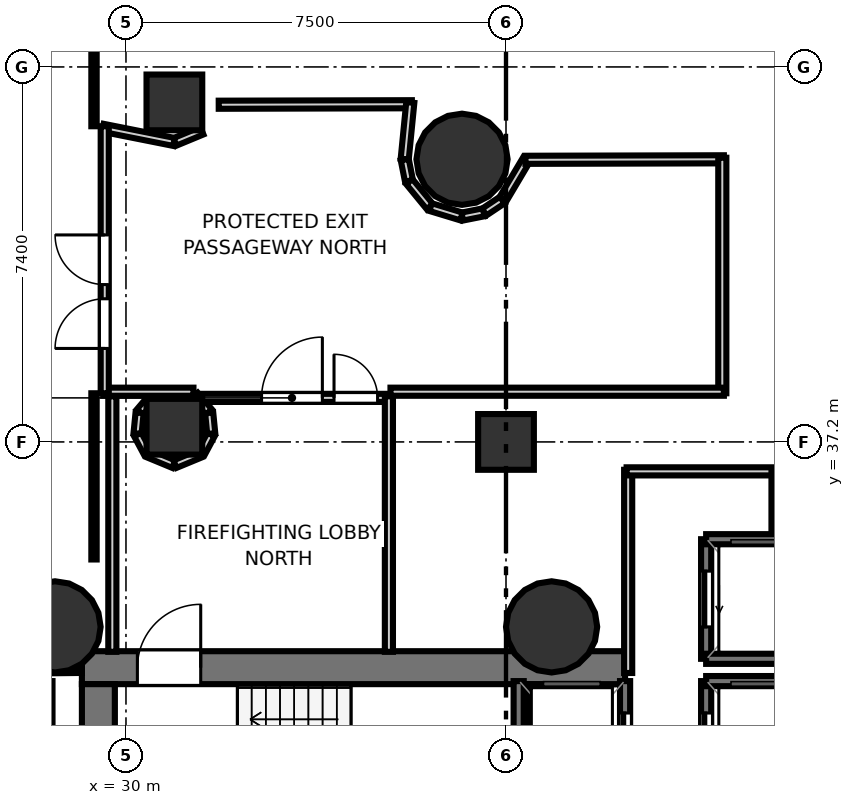
"""IFC4 building model, lengths in metres.
Left out: names, types, materials, properties, quantities, classifications, styles, units other than length and angle.
Written with IfcOpenShell. Run it as: python <this file> out.ifc"""

import sys

from ifc_helpers import new_model, si_unit, direction, frame, frame_2d, origin, origin_2d, place, context, subcontext, project, spatial, rectangle, hollow_circle, extrude, element, fill, save


model = new_model("IFC4")
c1 = context("Model", 3, precision=1e-05, world=origin(), true_north=direction((0.0, 1.0)))
c2 = subcontext(c1, "Body", "Model", "MODEL_VIEW")
j1 = project(units=[si_unit("LENGTHUNIT", "METRE"), si_unit("PLANEANGLEUNIT", "RADIAN")], contexts=[c1])
p1 = place(None, origin())
s1 = spatial("IfcSite", under=j1, at=p1, CompositionType="ELEMENT")
p2 = place(p1, origin())
s2 = spatial("IfcBuilding", under=s1, at=p2, CompositionType="ELEMENT")
p3 = place(p2, origin())
s3 = spatial("IfcBuildingStorey", under=s2, at=p3, CompositionType="ELEMENT", Elevation=0.0)
p4 = place(p3, frame((29.13, 32.745, 0.0), z_axis=(0.0, 0.0, 1.0), x_axis=(1.0, 0.0, 0.0)))
e1 = element("IfcWall", 1, at=p4, inside=s3, PredefinedType="SHEAR", context=c2, shape_type="SweptSolid", body=[
    extrude(rectangle(XDim=10.72, YDim=0.65, at=frame_2d((5.36, 0.0))), origin(), (0.0, 0.0, 1.0), 5.78),
])
p5 = place(p4, frame((1.095, 0.0, 0.0)))
e2 = element("IfcOpeningElement", 2, at=p5, cuts=e1, PredefinedType="OPENING", context=c2, shape_type="SweptSolid", body=[
    extrude(rectangle(XDim=1.25, YDim=2.15, at=frame_2d((0.625, 1.075))), frame((0.0, 0.335, 0.0), z_axis=(0.0, -1.0, 0.0), x_axis=(1.0, 0.0, 0.0)), (0.0, 0.0, 1.0), 0.67),
])
p6 = place(p3, frame((29.455, 24.98, 0.0), z_axis=(0.0, 0.0, 1.0), x_axis=(0.0, 1.0, 0.0)))
e3 = element("IfcWall", 3, at=p6, inside=s3, PredefinedType="SHEAR", context=c2, shape_type="SweptSolid", body=[
    extrude(rectangle(XDim=7.44, YDim=0.65, at=frame_2d((3.72, 0.0))), origin(), (0.0, 0.0, 1.0), 5.78),
])
p7 = place(p3, frame((38.18, 24.98, 0.0), z_axis=(0.0, 0.0, 1.0), x_axis=(0.0, 1.0, 0.0)))
e4 = element("IfcWall", 4, at=p7, inside=s3, PredefinedType="SHEAR", context=c2, shape_type="SweptSolid", body=[
    extrude(rectangle(XDim=7.44, YDim=0.5, at=frame_2d((3.72, 0.0))), origin(), (0.0, 0.0, 1.0), 5.78),
])
for number, where, z_axis, x_axis in (
    (5, (28.6, 33.55, 0.0), (0.0, 0.0, 1.0), (1.0, 0.0, 0.0)),
    (6, (38.4, 33.55, 0.0), (0.0, 0.0, 1.0), (1.0, 0.0, 0.0)),
    (7, (36.632, 42.778, 0.0), (0.0, 0.0, 1.0), (1.0, 0.0, 0.0)),
):
    element("IfcColumn", number, at=place(p3, frame(where, z_axis=z_axis, x_axis=x_axis)), inside=s3, PredefinedType="COLUMN", context=c2, shape_type="SweptSolid", body=[
        extrude(hollow_circle(Radius=0.9, WallThickness=0.045, at=origin_2d()), origin(), (0.0, 0.0, 1.0), 6.0),
    ])
for number, where, z_axis, x_axis in (
    (8, (30.955, 43.9, 0.0), (0.0, 0.0, 1.0), (1.0, 0.0, 0.0)),
    (9, (30.955, 37.5, 0.0), (0.0, 0.0, 1.0), (1.0, 0.0, 0.0)),
    (10, (37.5, 37.2, 0.0), (0.0, 0.0, 1.0), (1.0, 0.0, 0.0)),
):
    element("IfcColumn", number, at=place(p3, frame(where, z_axis=z_axis, x_axis=x_axis)), inside=s3, PredefinedType="COLUMN", context=c2, shape_type="SweptSolid", body=[
        extrude(rectangle(XDim=1.1, YDim=1.1, at=origin_2d()), origin(), (0.0, 0.0, 1.0), 6.0),
    ])
p8 = place(p3, frame((39.85, 30.12, 0.0), z_axis=(0.0, 0.0, 1.0), x_axis=(0.0, 1.0, 0.0)))
e11 = element("IfcWall", 11, at=p8, inside=s3, PredefinedType="SOLIDWALL", context=c2, shape_type="SweptSolid", body=[
    extrude(rectangle(XDim=2.36, YDim=0.2, at=frame_2d((1.18, 0.0))), origin(), (0.0, 0.0, 1.0), 5.78),
])
p9 = place(p8, frame((0.63, 0.0, 0.0)))
e12 = element("IfcOpeningElement", 12, at=p9, cuts=e11, PredefinedType="OPENING", context=c2, shape_type="SweptSolid", body=[
    extrude(rectangle(XDim=1.1, YDim=2.15, at=frame_2d((0.55, 1.075))), frame((0.0, 0.11, 0.0), z_axis=(0.0, -1.0, 0.0), x_axis=(1.0, 0.0, 0.0)), (0.0, 0.0, 1.0), 0.22),
])
p10 = place(p3, frame((37.75, 30.12, 0.0), z_axis=(0.0, 0.0, 1.0), x_axis=(0.0, 1.0, 0.0)))
e13 = element("IfcWall", 13, at=p10, inside=s3, PredefinedType="SOLIDWALL", context=c2, shape_type="SweptSolid", body=[
    extrude(rectangle(XDim=2.36, YDim=0.2, at=frame_2d((1.18, 0.0))), origin(), (0.0, 0.0, 1.0), 5.78),
])
p11 = place(p3, frame((41.45, 30.12, 0.0), z_axis=(0.0, 0.0, 1.0), x_axis=(0.0, 1.0, 0.0)))
e14 = element("IfcWall", 14, at=p11, inside=s3, PredefinedType="SOLIDWALL", context=c2, shape_type="SweptSolid", body=[
    extrude(rectangle(XDim=2.36, YDim=0.2, at=frame_2d((1.18, 0.0))), origin(), (0.0, 0.0, 1.0), 5.78),
])
p12 = place(p11, frame((0.63, 0.0, 0.0)))
e15 = element("IfcOpeningElement", 15, at=p12, cuts=e14, PredefinedType="OPENING", context=c2, shape_type="SweptSolid", body=[
    extrude(rectangle(XDim=1.1, YDim=2.15, at=frame_2d((0.55, 1.075))), frame((0.0, 0.11, 0.0), z_axis=(0.0, -1.0, 0.0), x_axis=(1.0, 0.0, 0.0)), (0.0, 0.0, 1.0), 0.22),
])
p13 = place(p3, frame((41.45, 32.48, 0.0), z_axis=(0.0, 0.0, 1.0), x_axis=(1.0, 0.0, 0.0)))
e16 = element("IfcWall", 16, at=p13, inside=s3, PredefinedType="SOLIDWALL", context=c2, shape_type="SweptSolid", body=[
    extrude(rectangle(XDim=2.1, YDim=0.2, at=frame_2d((1.05, 0.0))), origin(), (0.0, 0.0, 1.0), 5.78),
])
p14 = place(p3, frame((41.45, 32.92, 0.0), z_axis=(0.0, 0.0, 1.0), x_axis=(0.0, 1.0, 0.0)))
e17 = element("IfcWall", 17, at=p14, inside=s3, PredefinedType="SOLIDWALL", context=c2, shape_type="SweptSolid", body=[
    extrude(rectangle(XDim=2.36, YDim=0.2, at=frame_2d((1.18, 0.0))), origin(), (0.0, 0.0, 1.0), 5.78),
])
p15 = place(p14, frame((0.63, 0.0, 0.0)))
e18 = element("IfcOpeningElement", 18, at=p15, cuts=e17, PredefinedType="OPENING", context=c2, shape_type="SweptSolid", body=[
    extrude(rectangle(XDim=1.1, YDim=2.15, at=frame_2d((0.55, 1.075))), frame((0.0, 0.11, 0.0), z_axis=(0.0, -1.0, 0.0), x_axis=(1.0, 0.0, 0.0)), (0.0, 0.0, 1.0), 0.22),
])
for number, where, z_axis, x_axis in (
    (19, (41.45, 35.28, 0.0), (0.0, 0.0, 1.0), (1.0, 0.0, 0.0)),
    (20, (41.45, 32.92, 0.0), (0.0, 0.0, 1.0), (1.0, 0.0, 0.0)),
):
    element("IfcWall", number, at=place(p3, frame(where, z_axis=z_axis, x_axis=x_axis)), inside=s3, PredefinedType="SOLIDWALL", context=c2, shape_type="SweptSolid", body=[
        extrude(rectangle(XDim=2.1, YDim=0.2, at=frame_2d((1.05, 0.0))), origin(), (0.0, 0.0, 1.0), 5.78),
    ])
p16 = place(p3, frame((29.731, 33.058, 0.0), z_axis=(0.0, 0.0, 1.0), x_axis=(0.0, 1.0, 0.0)))
e21 = element("IfcWall", 21, at=p16, inside=s3, PredefinedType="PARTITIONING", context=c2, shape_type="SweptSolid", body=[
    extrude(rectangle(XDim=5.042, YDim=0.16, at=frame_2d((2.521, 0.0))), origin(), (0.0, 0.0, 1.0), 5.1),
])
p17 = place(p3, frame((30.555, 38.12, 0.0), z_axis=(0.0, 0.0, 1.0), x_axis=(-0.648223407971, -0.761450204123, 0.0)))
e22 = element("IfcWall", 22, at=p17, inside=s3, PredefinedType="PARTITIONING", context=c2, shape_type="SweptSolid", body=[
    extrude(rectangle(XDim=0.431, YDim=0.16, at=frame_2d((0.216, 0.0))), origin(), (0.0, 0.0, 1.0), 5.1),
])
for number, where, z_axis, x_axis in (
    (23, (30.269, 37.775, 0.0), (0.0, 0.0, 1.0), (-0.098, -0.995, 0.0)),
    (24, (30.232, 37.347, 0.0), (0.0, 0.0, 1.0), (0.471, -0.882, 0.0)),
):
    element("IfcWall", number, at=place(p3, frame(where, z_axis=z_axis, x_axis=x_axis)), inside=s3, PredefinedType="PARTITIONING", context=c2, shape_type="SweptSolid", body=[
        extrude(rectangle(XDim=0.412, YDim=0.16, at=frame_2d((0.206, 0.0))), origin(), (0.0, 0.0, 1.0), 5.1),
    ])
p18 = place(p3, frame((30.441, 36.969, 0.0), z_axis=(0.0, 0.0, 1.0), x_axis=(0.924044193671, -0.382285663011, 0.0)))
e25 = element("IfcWall", 25, at=p18, inside=s3, PredefinedType="PARTITIONING", context=c2, shape_type="SweptSolid", body=[
    extrude(rectangle(XDim=0.543, YDim=0.16, at=frame_2d((0.272, 0.0))), origin(), (0.0, 0.0, 1.0), 5.1),
])
p19 = place(p3, frame((30.967, 36.761, 0.0), z_axis=(0.0, 0.0, 1.0), x_axis=(0.923978502811, 0.382444409481, 0.0)))
e26 = element("IfcWall", 26, at=p19, inside=s3, PredefinedType="PARTITIONING", context=c2, shape_type="SweptSolid", body=[
    extrude(rectangle(XDim=0.543, YDim=0.16, at=frame_2d((0.271, 0.0))), origin(), (0.0, 0.0, 1.0), 5.1),
])
for number, where, z_axis, x_axis in (
    (27, (31.485, 36.983, 0.0), (0.0, 0.0, 1.0), (0.471, 0.882, 0.0)),
    (28, (31.683, 37.365, 0.0), (0.0, 0.0, 1.0), (-0.098, 0.995, 0.0)),
):
    element("IfcWall", number, at=place(p3, frame(where, z_axis=z_axis, x_axis=x_axis)), inside=s3, PredefinedType="PARTITIONING", context=c2, shape_type="SweptSolid", body=[
        extrude(rectangle(XDim=0.412, YDim=0.16, at=frame_2d((0.206, 0.0))), origin(), (0.0, 0.0, 1.0), 5.1),
    ])
p20 = place(p3, frame((31.635, 37.792, 0.0), z_axis=(0.0, 0.0, 1.0), x_axis=(-0.648223407971, 0.761450204123, 0.0)))
e29 = element("IfcWall", 29, at=p20, inside=s3, PredefinedType="PARTITIONING", context=c2, shape_type="SweptSolid", body=[
    extrude(rectangle(XDim=0.431, YDim=0.16, at=frame_2d((0.216, 0.0))), origin(), (0.0, 0.0, 1.0), 5.1),
])
p21 = place(p3, frame((31.332, 38.069, 0.0), z_axis=(0.0, 0.0, 1.0), x_axis=(1.0, 0.0, 0.0)))
e30 = element("IfcWall", 30, at=p21, inside=s3, PredefinedType="PARTITIONING", context=c2, shape_type="SweptSolid", body=[
    extrude(rectangle(XDim=3.888, YDim=0.16, at=frame_2d((1.944, 0.0))), origin(), (0.0, 0.0, 1.0), 5.1),
])
p22 = place(p21, frame((1.344, 0.0, 0.0)))
e31 = element("IfcOpeningElement", 31, at=p22, cuts=e30, PredefinedType="OPENING", context=c2, shape_type="SweptSolid", body=[
    extrude(rectangle(XDim=1.2, YDim=2.15, at=frame_2d((0.6, 1.075))), frame((0.0, 0.09, 0.0), z_axis=(0.0, -1.0, 0.0), x_axis=(1.0, 0.0, 0.0)), (0.0, 0.0, 1.0), 0.18),
])
p23 = place(p21, frame((2.774, 0.0, 0.0)))
e32 = element("IfcOpeningElement", 32, at=p23, cuts=e30, PredefinedType="OPENING", context=c2, shape_type="SweptSolid", body=[
    extrude(rectangle(XDim=0.86, YDim=2.05, at=frame_2d((0.43, 1.025))), frame((0.0, 0.09, 0.0), z_axis=(0.0, -1.0, 0.0), x_axis=(1.0, 0.0, 0.0)), (0.0, 0.0, 1.0), 0.18),
])
p24 = place(p3, frame((35.189, 38.1, 0.0), z_axis=(0.0, 0.0, 1.0), x_axis=(0.0, -1.0, 0.0)))
e33 = element("IfcWall", 33, at=p24, inside=s3, PredefinedType="PARTITIONING", context=c2, shape_type="SweptSolid", body=[
    extrude(rectangle(XDim=5.042, YDim=0.16, at=frame_2d((2.521, 0.0))), origin(), (0.0, 0.0, 1.0), 5.1),
])
p25 = place(p3, frame((39.911, 32.64, 0.0), z_axis=(0.0, 0.0, 1.0), x_axis=(0.0, 1.0, 0.0)))
e34 = element("IfcWall", 34, at=p25, inside=s3, PredefinedType="PARTITIONING", context=c2, shape_type="SweptSolid", body=[
    extrude(rectangle(XDim=4.01, YDim=0.16, at=frame_2d((2.005, 0.0))), origin(), (0.0, 0.0, 1.0), 5.1),
])
p26 = place(p3, frame((39.88, 36.619, 0.0), z_axis=(0.0, 0.0, 1.0), x_axis=(1.0, 0.0, 0.0)))
e35 = element("IfcWall", 35, at=p26, inside=s3, PredefinedType="PARTITIONING", context=c2, shape_type="SweptSolid", body=[
    extrude(rectangle(XDim=2.97, YDim=0.16, at=frame_2d((1.485, 0.0))), origin(), (0.0, 0.0, 1.0), 5.1),
])
p27 = place(p3, frame((42.819, 36.65, 0.0), z_axis=(0.0, 0.0, 1.0), x_axis=(0.0, -1.0, 0.0)))
e36 = element("IfcWall", 36, at=p27, inside=s3, PredefinedType="PARTITIONING", context=c2, shape_type="SweptSolid", body=[
    extrude(rectangle(XDim=1.17, YDim=0.16, at=frame_2d((0.585, 0.0))), origin(), (0.0, 0.0, 1.0), 5.1),
])
p28 = place(p3, frame((29.544, 43.399, 0.0), z_axis=(0.0, 0.0, 1.0), x_axis=(0.980789794915, -0.195067624662, 0.0)))
e37 = element("IfcWall", 37, at=p28, inside=s3, PredefinedType="PARTITIONING", context=c2, shape_type="SweptSolid", body=[
    extrude(rectangle(XDim=1.433, YDim=0.16, at=frame_2d((0.717, 0.0))), origin(), (0.0, 0.0, 1.0), 5.1),
])
p29 = place(p3, frame((30.967, 43.121, 0.0), z_axis=(0.0, 0.0, 1.0), x_axis=(0.92383017907, 0.382802560388, 0.0)))
e38 = element("IfcWall", 38, at=p29, inside=s3, PredefinedType="PARTITIONING", context=c2, shape_type="SweptSolid", body=[
    extrude(rectangle(XDim=0.574, YDim=0.16, at=frame_2d((0.287, 0.0))), origin(), (0.0, 0.0, 1.0), 5.1),
])
p30 = place(p3, frame((31.83, 43.854, 0.0), z_axis=(0.0, 0.0, 1.0), x_axis=(0.999996718177, 0.002561959183, 0.0)))
e39 = element("IfcWall", 39, at=p30, inside=s3, PredefinedType="PARTITIONING", context=c2, shape_type="SweptSolid", body=[
    extrude(rectangle(XDim=3.812, YDim=0.16, at=frame_2d((1.906, 0.0))), origin(), (0.0, 0.0, 1.0), 5.1),
])
p31 = place(p3, frame((35.611, 43.898, 0.0), z_axis=(0.0, 0.0, 1.0), x_axis=(-0.097888269922, -0.995197410875, 0.0)))
e40 = element("IfcWall", 40, at=p31, inside=s3, PredefinedType="PARTITIONING", context=c2, shape_type="SweptSolid", body=[
    extrude(rectangle(XDim=1.122, YDim=0.16, at=frame_2d((0.561, 0.0))), origin(), (0.0, 0.0, 1.0), 5.1),
])
p32 = place(p3, frame((35.502, 42.772, 0.0), z_axis=(0.0, 0.0, 1.0), x_axis=(0.194584082332, -0.980885841932, 0.0)))
e41 = element("IfcWall", 41, at=p32, inside=s3, PredefinedType="PARTITIONING", context=c2, shape_type="SweptSolid", body=[
    extrude(rectangle(XDim=0.429, YDim=0.16, at=frame_2d((0.215, 0.0))), origin(), (0.0, 0.0, 1.0), 5.1),
])
p33 = place(p3, frame((35.592, 42.337, 0.0), z_axis=(0.0, 0.0, 1.0), x_axis=(0.634299034474, -0.773087792469, 0.0)))
e42 = element("IfcWall", 42, at=p33, inside=s3, PredefinedType="PARTITIONING", context=c2, shape_type="SweptSolid", body=[
    extrude(rectangle(XDim=0.638, YDim=0.16, at=frame_2d((0.319, 0.0))), origin(), (0.0, 0.0, 1.0), 5.1),
])
p34 = place(p3, frame((36.012, 41.834, 0.0), z_axis=(0.0, 0.0, 1.0), x_axis=(0.956863497658, -0.290537857859, 0.0)))
e43 = element("IfcWall", 43, at=p34, inside=s3, PredefinedType="PARTITIONING", context=c2, shape_type="SweptSolid", body=[
    extrude(rectangle(XDim=0.639, YDim=0.16, at=frame_2d((0.319, 0.0))), origin(), (0.0, 0.0, 1.0), 5.1),
])
p35 = place(p3, frame((36.638, 41.648, 0.0), z_axis=(0.0, 0.0, 1.0), x_axis=(0.980907366398, 0.194475547425, 0.0)))
e44 = element("IfcWall", 44, at=p35, inside=s3, PredefinedType="PARTITIONING", context=c2, shape_type="SweptSolid", body=[
    extrude(rectangle(XDim=0.429, YDim=0.16, at=frame_2d((0.215, 0.0))), origin(), (0.0, 0.0, 1.0), 5.1),
])
p36 = place(p3, frame((37.07, 41.736, 0.0), z_axis=(0.0, 0.0, 1.0), x_axis=(0.83152455419, 0.555487997871, 0.0)))
e45 = element("IfcWall", 45, at=p36, inside=s3, PredefinedType="PARTITIONING", context=c2, shape_type="SweptSolid", body=[
    extrude(rectangle(XDim=0.429, YDim=0.16, at=frame_2d((0.214, 0.0))), origin(), (0.0, 0.0, 1.0), 5.1),
])
p37 = place(p3, frame((37.437, 41.984, 0.0), z_axis=(0.0, 0.0, 1.0), x_axis=(0.510818143379, 0.859688795085, 0.0)))
e46 = element("IfcWall", 46, at=p37, inside=s3, PredefinedType="PARTITIONING", context=c2, shape_type="SweptSolid", body=[
    extrude(rectangle(XDim=0.929, YDim=0.16, at=frame_2d((0.464, 0.0))), origin(), (0.0, 0.0, 1.0), 5.1),
])
p38 = place(p3, frame((37.884, 42.767, 0.0), z_axis=(0.0, 0.0, 1.0), x_axis=(0.999996890193, 0.002493913312, 0.0)))
e47 = element("IfcWall", 47, at=p38, inside=s3, PredefinedType="PARTITIONING", context=c2, shape_type="SweptSolid", body=[
    extrude(rectangle(XDim=3.916, YDim=0.16, at=frame_2d((1.958, 0.0))), origin(), (0.0, 0.0, 1.0), 5.1),
])
p39 = place(p3, frame((41.769, 42.808, 0.0), z_axis=(0.0, 0.0, 1.0), x_axis=(0.0, -1.0, 0.0)))
e48 = element("IfcWall", 48, at=p39, inside=s3, PredefinedType="PARTITIONING", context=c2, shape_type="SweptSolid", body=[
    extrude(rectangle(XDim=4.648, YDim=0.16, at=frame_2d((2.324, 0.0))), origin(), (0.0, 0.0, 1.0), 5.1),
])
p40 = place(p3, frame((41.8, 38.191, 0.0), z_axis=(0.0, 0.0, 1.0), x_axis=(-1.0, 0.0, 0.0)))
e49 = element("IfcWall", 49, at=p40, inside=s3, PredefinedType="PARTITIONING", context=c2, shape_type="SweptSolid", body=[
    extrude(rectangle(XDim=6.58, YDim=0.16, at=frame_2d((3.29, 0.0))), origin(), (0.0, 0.0, 1.0), 5.1),
])
p41 = place(p3, frame((31.332, 38.191, 0.0), z_axis=(0.0, 0.0, 1.0), x_axis=(-1.0, 0.0, 0.0)))
e50 = element("IfcWall", 50, at=p41, inside=s3, PredefinedType="PARTITIONING", context=c2, shape_type="SweptSolid", body=[
    extrude(rectangle(XDim=1.782, YDim=0.16, at=frame_2d((0.891, 0.0))), origin(), (0.0, 0.0, 1.0), 5.1),
])
p42 = place(p3, frame((29.581, 38.16, 0.0), z_axis=(0.0, 0.0, 1.0), x_axis=(0.0, 1.0, 0.0)))
e51 = element("IfcWall", 51, at=p42, inside=s3, PredefinedType="PARTITIONING", context=c2, shape_type="SweptSolid", body=[
    extrude(rectangle(XDim=5.27, YDim=0.16, at=frame_2d((2.635, 0.0))), origin(), (0.0, 0.0, 1.0), 5.1),
])
p43 = place(p42, frame((2.145, 0.0, 0.0)))
e52 = element("IfcOpeningElement", 52, at=p43, cuts=e51, PredefinedType="OPENING", context=c2, shape_type="SweptSolid", body=[
    extrude(rectangle(XDim=0.98, YDim=2.1, at=frame_2d((0.49, 1.05))), frame((0.0, 0.09, 0.0), z_axis=(0.0, -1.0, 0.0), x_axis=(1.0, 0.0, 0.0)), (0.0, 0.0, 1.0), 0.18),
])
p44 = place(p42, frame((0.885, 0.0, 0.0)))
e53 = element("IfcOpeningElement", 53, at=p44, cuts=e51, PredefinedType="OPENING", context=c2, shape_type="SweptSolid", body=[
    extrude(rectangle(XDim=0.98, YDim=2.1, at=frame_2d((0.49, 1.05))), frame((0.0, 0.09, 0.0), z_axis=(0.0, -1.0, 0.0), x_axis=(1.0, 0.0, 0.0)), (0.0, 0.0, 1.0), 0.18),
])
p45 = place(p3, frame((29.369, 46.5, 0.0), z_axis=(0.0, 0.0, 1.0), x_axis=(0.0, -1.0, 0.0)))
e54 = element("IfcWall", 54, at=p45, inside=s3, PredefinedType="PARTITIONING", context=c2, shape_type="SweptSolid", body=[
    extrude(rectangle(XDim=3.07, YDim=0.105, at=frame_2d((1.535, 0.0))), origin(), (0.0, 0.0, 1.0), 5.1),
])
p46 = place(p3, frame((29.369, 38.16, 0.0), z_axis=(0.0, 0.0, 1.0), x_axis=(0.0, -1.0, 0.0)))
e55 = element("IfcWall", 55, at=p46, inside=s3, PredefinedType="PARTITIONING", context=c2, shape_type="SweptSolid", body=[
    extrude(rectangle(XDim=3.28, YDim=0.105, at=frame_2d((1.64, 0.0))), origin(), (0.0, 0.0, 1.0), 5.1),
])
p47 = place(p3, frame((29.13, 32.701, 0.0), z_axis=(0.0, 0.0, 1.0), x_axis=(-0.999941987134, -0.010771367904, 0.0)))
e56 = element("IfcWall", 56, at=p47, inside=s3, PredefinedType="PARTITIONING", context=c2, shape_type="SweptSolid", body=[
    extrude(rectangle(XDim=0.68, YDim=0.12, at=frame_2d((0.34, 0.0))), origin(), (0.0, 0.0, 1.0), 5.1),
])
p48 = place(p5, origin())
e57 = element("IfcDoor", 57, at=p48, inside=s3, OperationType="SINGLE_SWING_RIGHT", PredefinedType="DOOR", context=c2, shape_type="SweptSolid", body=[
    extrude(rectangle(XDim=1.25, YDim=2.15, at=frame_2d((0.625, 1.075))), frame((0.0, 0.025, 0.0), z_axis=(0.0, -1.0, 0.0), x_axis=(1.0, 0.0, 0.0)), (0.0, 0.0, 1.0), 0.05),
])
fill(e2, e57)
p49 = place(p9, origin())
e58 = element("IfcDoor", 58, at=p49, inside=s3, OperationType="SLIDING_TO_LEFT", PredefinedType="DOOR", context=c2, shape_type="SweptSolid", body=[
    extrude(rectangle(XDim=1.1, YDim=2.15, at=frame_2d((0.55, 1.075))), frame((0.0, 0.025, 0.0), z_axis=(0.0, -1.0, 0.0), x_axis=(1.0, 0.0, 0.0)), (0.0, 0.0, 1.0), 0.05),
])
fill(e12, e58)
p50 = place(p12, origin())
e59 = element("IfcDoor", 59, at=p50, inside=s3, OperationType="SLIDING_TO_LEFT", PredefinedType="DOOR", context=c2, shape_type="SweptSolid", body=[
    extrude(rectangle(XDim=1.1, YDim=2.15, at=frame_2d((0.55, 1.075))), frame((0.0, 0.025, 0.0), z_axis=(0.0, -1.0, 0.0), x_axis=(1.0, 0.0, 0.0)), (0.0, 0.0, 1.0), 0.05),
])
fill(e15, e59)
p51 = place(p15, origin())
e60 = element("IfcDoor", 60, at=p51, inside=s3, OperationType="SLIDING_TO_LEFT", PredefinedType="DOOR", context=c2, shape_type="SweptSolid", body=[
    extrude(rectangle(XDim=1.1, YDim=2.15, at=frame_2d((0.55, 1.075))), frame((0.0, 0.025, 0.0), z_axis=(0.0, -1.0, 0.0), x_axis=(1.0, 0.0, 0.0)), (0.0, 0.0, 1.0), 0.05),
])
fill(e18, e60)
p52 = place(p22, origin())
e61 = element("IfcDoor", 61, at=p52, inside=s3, OperationType="SINGLE_SWING_RIGHT", PredefinedType="DOOR", context=c2, shape_type="SweptSolid", body=[
    extrude(rectangle(XDim=1.2, YDim=2.15, at=frame_2d((0.6, 1.075))), frame((0.0, 0.025, 0.0), z_axis=(0.0, -1.0, 0.0), x_axis=(1.0, 0.0, 0.0)), (0.0, 0.0, 1.0), 0.05),
])
fill(e31, e61)
p53 = place(p43, origin())
e62 = element("IfcDoor", 62, at=p53, inside=s3, OperationType="SINGLE_SWING_RIGHT", PredefinedType="DOOR", context=c2, shape_type="SweptSolid", body=[
    extrude(rectangle(XDim=0.98, YDim=2.1, at=frame_2d((0.49, 1.05))), frame((0.0, 0.025, 0.0), z_axis=(0.0, -1.0, 0.0), x_axis=(1.0, 0.0, 0.0)), (0.0, 0.0, 1.0), 0.05),
])
fill(e52, e62)
p54 = place(p23, origin())
e63 = element("IfcDoor", 63, at=p54, inside=s3, OperationType="SINGLE_SWING_LEFT", PredefinedType="DOOR", context=c2, shape_type="SweptSolid", body=[
    extrude(rectangle(XDim=0.86, YDim=2.05, at=frame_2d((0.43, 1.025))), frame((0.0, 0.025, 0.0), z_axis=(0.0, -1.0, 0.0), x_axis=(1.0, 0.0, 0.0)), (0.0, 0.0, 1.0), 0.05),
])
fill(e32, e63)
p55 = place(p44, origin())
e64 = element("IfcDoor", 64, at=p55, inside=s3, OperationType="SINGLE_SWING_LEFT", PredefinedType="DOOR", context=c2, shape_type="SweptSolid", body=[
    extrude(rectangle(XDim=0.98, YDim=2.1, at=frame_2d((0.49, 1.05))), frame((0.0, 0.025, 0.0), z_axis=(0.0, -1.0, 0.0), x_axis=(1.0, 0.0, 0.0)), (0.0, 0.0, 1.0), 0.05),
])
fill(e53, e64)
save(model, sys.argv[1])
